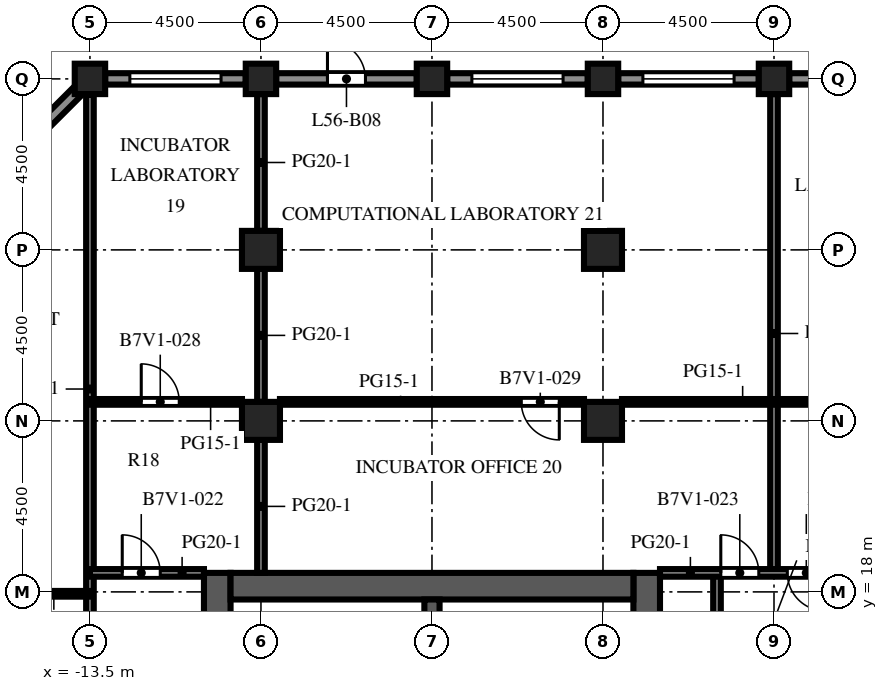
"""IFC4 building model, lengths in metres.
Left out: names, types, materials, properties, quantities, classifications, styles, units other than length and angle.
Written with IfcOpenShell. Run it as: python <this file> out.ifc"""

import sys

from ifc_helpers import new_model, si_unit, direction, frame, frame_2d, origin, origin_2d, place, context, subcontext, project, spatial, rectangle, extrude, element, fill, save


model = new_model("IFC4")
c1 = context("Model", 3, precision=1e-05, world=origin(), true_north=direction((0.0, 1.0)))
c2 = subcontext(c1, "Body", "Model", "MODEL_VIEW")
j1 = project(units=[si_unit("LENGTHUNIT", "METRE"), si_unit("PLANEANGLEUNIT", "RADIAN")], contexts=[c1])
p1 = place(None, origin())
s1 = spatial("IfcSite", under=j1, at=p1, CompositionType="ELEMENT")
p2 = place(p1, origin())
s2 = spatial("IfcBuilding", under=s1, at=p2, CompositionType="ELEMENT")
p3 = place(p2, frame((0.0, 0.0, 248.0)))
s3 = spatial("IfcBuildingStorey", under=s2, at=p3, CompositionType="ELEMENT", Elevation=248.0)
for number, where, z_axis, x_axis in (
    (1, (-13.5, 31.5, 0.0), (0.0, 0.0, 1.0), (1.0, 0.0, 0.0)),
    (2, (-9.0, 31.5, 0.0), (0.0, 0.0, 1.0), (1.0, 0.0, 0.0)),
    (3, (-4.5, 31.5, 0.0), (0.0, 0.0, 1.0), (1.0, 0.0, 0.0)),
    (4, (0.0, 31.5, 0.0), (0.0, 0.0, 1.0), (1.0, 0.0, 0.0)),
    (5, (4.5, 31.5, 0.0), (0.0, 0.0, 1.0), (1.0, 0.0, 0.0)),
):
    element("IfcColumn", number, at=place(p3, frame(where, z_axis=z_axis, x_axis=x_axis)), inside=s3, PredefinedType="COLUMN", context=c2, shape_type="SweptSolid", body=[
        extrude(rectangle(XDim=0.8, YDim=0.8, at=origin_2d()), origin(), (0.0, 0.0, 1.0), 4.1),
    ])
for number, where, z_axis, x_axis in (
    (6, (-9.0, 22.5, 0.0), (0.0, 0.0, 1.0), (1.0, 0.0, 0.0)),
    (7, (-9.0, 27.0, 0.0), (0.0, 0.0, 1.0), (1.0, 0.0, 0.0)),
    (8, (0.0, 22.5, 0.0), (0.0, 0.0, 1.0), (1.0, 0.0, 0.0)),
    (9, (0.0, 27.0, 0.0), (0.0, 0.0, 1.0), (1.0, 0.0, 0.0)),
):
    element("IfcColumn", number, at=place(p3, frame(where, z_axis=z_axis, x_axis=x_axis)), inside=s3, PredefinedType="COLUMN", context=c2, shape_type="SweptSolid", body=[
        extrude(rectangle(XDim=1.0, YDim=1.0, at=origin_2d()), origin(), (0.0, 0.0, 1.0), 4.1),
    ])
p4 = place(p3, frame((-10.15, -9.0, 0.0), z_axis=(0.0, 0.0, 1.0), x_axis=(0.0, 1.0, 0.0)))
e10 = element("IfcWall", 10, at=p4, inside=s3, PredefinedType="SHEAR", context=c2, shape_type="SweptSolid", body=[
    extrude(rectangle(XDim=27.5, YDim=0.7, at=frame_2d((13.75, 0.0))), origin(), (0.0, 0.0, 1.0), 4.1),
])
p5 = place(p4, frame((12.55, 0.0, 0.0)))
e11 = element("IfcOpeningElement", 11, at=p5, cuts=e10, PredefinedType="OPENING", context=c2, shape_type="SweptSolid", body=[
    extrude(rectangle(XDim=2.4, YDim=2.4, at=frame_2d((1.2, 1.2))), frame((0.0, 0.36, 0.0), z_axis=(0.0, -1.0, 0.0), x_axis=(1.0, 0.0, 0.0)), (0.0, 0.0, 1.0), 0.72),
])
p6 = place(p4, frame((6.825, 0.0, 0.0)))
e12 = element("IfcOpeningElement", 12, at=p6, cuts=e10, PredefinedType="OPENING", context=c2, shape_type="SweptSolid", body=[
    extrude(rectangle(XDim=1.2, YDim=2.1, at=frame_2d((0.6, 1.05))), frame((0.0, 0.36, 0.0), z_axis=(0.0, -1.0, 0.0), x_axis=(1.0, 0.0, 0.0)), (0.0, 0.0, 1.0), 0.72),
])
p7 = place(p4, frame((19.475, 0.0, 0.0)))
e13 = element("IfcOpeningElement", 13, at=p7, cuts=e10, PredefinedType="OPENING", context=c2, shape_type="SweptSolid", body=[
    extrude(rectangle(XDim=1.2, YDim=2.1, at=frame_2d((0.6, 1.05))), frame((0.0, 0.36, 0.0), z_axis=(0.0, -1.0, 0.0), x_axis=(1.0, 0.0, 0.0)), (0.0, 0.0, 1.0), 0.72),
])
p8 = place(p3, frame((1.15, -9.0, 0.0), z_axis=(0.0, 0.0, 1.0), x_axis=(0.0, 1.0, 0.0)))
e14 = element("IfcWall", 14, at=p8, inside=s3, PredefinedType="SHEAR", context=c2, shape_type="SweptSolid", body=[
    extrude(rectangle(XDim=27.5, YDim=0.7, at=frame_2d((13.75, 0.0))), origin(), (0.0, 0.0, 1.0), 4.1),
])
p9 = place(p8, frame((12.55, 0.0, 0.0)))
e15 = element("IfcOpeningElement", 15, at=p9, cuts=e14, PredefinedType="OPENING", context=c2, shape_type="SweptSolid", body=[
    extrude(rectangle(XDim=2.4, YDim=2.4, at=frame_2d((1.2, 1.2))), frame((0.0, 0.36, 0.0), z_axis=(0.0, -1.0, 0.0), x_axis=(1.0, 0.0, 0.0)), (0.0, 0.0, 1.0), 0.72),
])
p10 = place(p8, frame((3.9, 0.0, 0.0)))
e16 = element("IfcOpeningElement", 16, at=p10, cuts=e14, PredefinedType="OPENING", context=c2, shape_type="SweptSolid", body=[
    extrude(rectangle(XDim=1.2, YDim=2.1, at=frame_2d((0.6, 1.05))), frame((0.0, 0.36, 0.0), z_axis=(0.0, -1.0, 0.0), x_axis=(1.0, 0.0, 0.0)), (0.0, 0.0, 1.0), 0.72),
])
p11 = place(p8, frame((22.4, 0.0, 0.0)))
e17 = element("IfcOpeningElement", 17, at=p11, cuts=e14, PredefinedType="OPENING", context=c2, shape_type="SweptSolid", body=[
    extrude(rectangle(XDim=1.2, YDim=2.1, at=frame_2d((0.6, 1.05))), frame((0.0, 0.36, 0.0), z_axis=(0.0, -1.0, 0.0), x_axis=(1.0, 0.0, 0.0)), (0.0, 0.0, 1.0), 0.72),
])
p12 = place(p3, frame((-9.8, 18.15, 0.0), z_axis=(0.0, 0.0, 1.0), x_axis=(1.0, 0.0, 0.0)))
e18 = element("IfcWall", 18, at=p12, inside=s3, PredefinedType="SHEAR", context=c2, shape_type="SweptSolid", body=[
    extrude(rectangle(XDim=10.6, YDim=0.7, at=frame_2d((5.3, 0.0))), origin(), (0.0, 0.0, 1.0), 4.1),
])
p13 = place(p3, frame((-4.5, 10.2, 0.0), z_axis=(0.0, 0.0, 1.0), x_axis=(0.0, 1.0, 0.0)))
e19 = element("IfcWall", 19, at=p13, inside=s3, PredefinedType="SHEAR", context=c2, shape_type="SweptSolid", body=[
    extrude(rectangle(XDim=7.6, YDim=0.4, at=frame_2d((3.8, 0.0))), origin(), (0.0, 0.0, 1.0), 4.1),
])
p14 = place(p3, frame((4.9, 31.5, 0.0), z_axis=(0.0, 0.0, 1.0), x_axis=(1.0, 0.0, 0.0)))
e20 = element("IfcWall", 20, at=p14, inside=s3, PredefinedType="SOLIDWALL", context=c2, shape_type="SweptSolid", body=[
    extrude(rectangle(XDim=3.7, YDim=0.3, at=frame_2d((1.85, 0.0))), origin(), (0.0, 0.0, 1.0), 2.85),
])
p15 = place(p14, frame((0.65, 0.0, 0.8)))
e21 = element("IfcOpeningElement", 21, at=p15, cuts=e20, PredefinedType="OPENING", context=c2, shape_type="SweptSolid", body=[
    extrude(rectangle(XDim=2.4, YDim=1.7, at=frame_2d((1.2, 0.85))), frame((0.0, 0.16, 0.0), z_axis=(0.0, -1.0, 0.0), x_axis=(1.0, 0.0, 0.0)), (0.0, 0.0, 1.0), 0.32),
])
p16 = place(p3, frame((0.4, 31.5, 0.0), z_axis=(0.0, 0.0, 1.0), x_axis=(1.0, 0.0, 0.0)))
e22 = element("IfcWall", 22, at=p16, inside=s3, PredefinedType="SOLIDWALL", context=c2, shape_type="SweptSolid", body=[
    extrude(rectangle(XDim=3.7, YDim=0.3, at=frame_2d((1.85, 0.0))), origin(), (0.0, 0.0, 1.0), 2.85),
])
p17 = place(p16, frame((0.65, 0.0, 0.8)))
e23 = element("IfcOpeningElement", 23, at=p17, cuts=e22, PredefinedType="OPENING", context=c2, shape_type="SweptSolid", body=[
    extrude(rectangle(XDim=2.4, YDim=1.7, at=frame_2d((1.2, 0.85))), frame((0.0, 0.16, 0.0), z_axis=(0.0, -1.0, 0.0), x_axis=(1.0, 0.0, 0.0)), (0.0, 0.0, 1.0), 0.32),
])
p18 = place(p3, frame((-4.1, 31.5, 0.0), z_axis=(0.0, 0.0, 1.0), x_axis=(1.0, 0.0, 0.0)))
e24 = element("IfcWall", 24, at=p18, inside=s3, PredefinedType="SOLIDWALL", context=c2, shape_type="SweptSolid", body=[
    extrude(rectangle(XDim=3.7, YDim=0.3, at=frame_2d((1.85, 0.0))), origin(), (0.0, 0.0, 1.0), 2.85),
])
p19 = place(p18, frame((0.65, 0.0, 0.8)))
e25 = element("IfcOpeningElement", 25, at=p19, cuts=e24, PredefinedType="OPENING", context=c2, shape_type="SweptSolid", body=[
    extrude(rectangle(XDim=2.4, YDim=1.7, at=frame_2d((1.2, 0.85))), frame((0.0, 0.16, 0.0), z_axis=(0.0, -1.0, 0.0), x_axis=(1.0, 0.0, 0.0)), (0.0, 0.0, 1.0), 0.32),
])
p20 = place(p3, frame((-8.6, 31.5, 0.0), z_axis=(0.0, 0.0, 1.0), x_axis=(1.0, 0.0, 0.0)))
e26 = element("IfcWall", 26, at=p20, inside=s3, PredefinedType="SOLIDWALL", context=c2, shape_type="SweptSolid", body=[
    extrude(rectangle(XDim=3.7, YDim=0.3, at=frame_2d((1.85, 0.0))), origin(), (0.0, 0.0, 1.0), 2.85),
])
p21 = place(p20, frame((1.35, 0.0, 0.0)))
e27 = element("IfcOpeningElement", 27, at=p21, cuts=e26, PredefinedType="OPENING", context=c2, shape_type="SweptSolid", body=[
    extrude(rectangle(XDim=1.0, YDim=2.2, at=frame_2d((0.5, 1.1))), frame((0.0, 0.16, 0.0), z_axis=(0.0, -1.0, 0.0), x_axis=(1.0, 0.0, 0.0)), (0.0, 0.0, 1.0), 0.32),
])
p22 = place(p3, frame((-13.1, 31.5, 0.0), z_axis=(0.0, 0.0, 1.0), x_axis=(1.0, 0.0, 0.0)))
e28 = element("IfcWall", 28, at=p22, inside=s3, PredefinedType="SOLIDWALL", context=c2, shape_type="SweptSolid", body=[
    extrude(rectangle(XDim=3.7, YDim=0.3, at=frame_2d((1.85, 0.0))), origin(), (0.0, 0.0, 1.0), 2.85),
])
p23 = place(p22, frame((0.65, 0.0, 0.8)))
e29 = element("IfcOpeningElement", 29, at=p23, cuts=e28, PredefinedType="OPENING", context=c2, shape_type="SweptSolid", body=[
    extrude(rectangle(XDim=2.4, YDim=1.7, at=frame_2d((1.2, 0.85))), frame((0.0, 0.16, 0.0), z_axis=(0.0, -1.0, 0.0), x_axis=(1.0, 0.0, 0.0)), (0.0, 0.0, 1.0), 0.32),
])
p24 = place(p3, frame((-17.706, 27.294, 0.0), z_axis=(0.0, 0.0, 1.0), x_axis=(0.707106781187, 0.707106781187, 0.0)))
e30 = element("IfcWall", 30, at=p24, inside=s3, PredefinedType="SOLIDWALL", context=c2, shape_type="SweptSolid", body=[
    extrude(rectangle(XDim=5.532, YDim=0.3, at=frame_2d((2.766, 0.0))), origin(), (0.0, 0.0, 1.0), 2.85),
])
p25 = place(p24, frame((2.166, 0.0, 0.0)))
e31 = element("IfcOpeningElement", 31, at=p25, cuts=e30, PredefinedType="OPENING", context=c2, shape_type="SweptSolid", body=[
    extrude(rectangle(XDim=1.2, YDim=2.2, at=frame_2d((0.6, 1.1))), frame((0.0, 0.16, 0.0), z_axis=(0.0, -1.0, 0.0), x_axis=(1.0, 0.0, 0.0)), (0.0, 0.0, 1.0), 0.32),
])
p26 = place(p3, frame((-0.6, 14.912, 0.0), z_axis=(0.0, 0.0, 1.0), x_axis=(0.0, 1.0, 0.0)))
e32 = element("IfcWall", 32, at=p26, inside=s3, PredefinedType="PARTITIONING", context=c2, shape_type="SweptSolid", body=[
    extrude(rectangle(XDim=2.888, YDim=0.1, at=frame_2d((1.444, 0.0))), origin(), (0.0, 0.0, 1.0), 3.65),
])
p27 = place(p26, frame((0.944, 0.0, 0.0)))
e33 = element("IfcOpeningElement", 33, at=p27, cuts=e32, PredefinedType="OPENING", context=c2, shape_type="SweptSolid", body=[
    extrude(rectangle(XDim=1.0, YDim=2.1, at=frame_2d((0.5, 1.05))), frame((0.0, 0.06, 0.0), z_axis=(0.0, -1.0, 0.0), x_axis=(1.0, 0.0, 0.0)), (0.0, 0.0, 1.0), 0.12),
])
p28 = place(p3, frame((-13.5, 6.25, 0.0), z_axis=(0.0, 0.0, 1.0), x_axis=(0.0, 1.0, 0.0)))
e34 = element("IfcWall", 34, at=p28, inside=s3, PredefinedType="PARTITIONING", context=c2, shape_type="SweptSolid", body=[
    extrude(rectangle(XDim=24.827, YDim=0.2, at=frame_2d((12.414, 0.0))), origin(), (0.0, 0.0, 1.0), 3.65),
])
p29 = place(p28, frame((8.35, 0.0, 0.0)))
e35 = element("IfcOpeningElement", 35, at=p29, cuts=e34, PredefinedType="OPENING", context=c2, shape_type="SweptSolid", body=[
    extrude(rectangle(XDim=1.0, YDim=2.1, at=frame_2d((0.5, 1.05))), frame((0.0, 0.11, 0.0), z_axis=(0.0, -1.0, 0.0), x_axis=(1.0, 0.0, 0.0)), (0.0, 0.0, 1.0), 0.22),
])
for number, where, z_axis, x_axis in (
    (36, (-9.0, 18.5, 0.0), (0.0, 0.0, 1.0), (0.0, 1.0, 0.0)),
    (37, (-9.0, 23.0, 0.0), (0.0, 0.0, 1.0), (0.0, 1.0, 0.0)),
):
    element("IfcWall", number, at=place(p3, frame(where, z_axis=z_axis, x_axis=x_axis)), inside=s3, PredefinedType="PARTITIONING", context=c2, shape_type="SweptSolid", body=[
        extrude(rectangle(XDim=3.5, YDim=0.2, at=frame_2d((1.75, 0.0))), origin(), (0.0, 0.0, 1.0), 3.65),
    ])
p30 = place(p3, frame((-9.0, 27.5, 0.0), z_axis=(0.0, 0.0, 1.0), x_axis=(0.0, 1.0, 0.0)))
e38 = element("IfcWall", 38, at=p30, inside=s3, PredefinedType="PARTITIONING", context=c2, shape_type="SweptSolid", body=[
    extrude(rectangle(XDim=3.6, YDim=0.2, at=frame_2d((1.8, 0.0))), origin(), (0.0, 0.0, 1.0), 3.65),
])
p31 = place(p3, frame((3.0, 6.7, 0.0), z_axis=(0.0, 0.0, 1.0), x_axis=(0.0, 1.0, 0.0)))
e39 = element("IfcWall", 39, at=p31, inside=s3, PredefinedType="PARTITIONING", context=c2, shape_type="SweptSolid", body=[
    extrude(rectangle(XDim=11.8, YDim=0.2, at=frame_2d((5.9, 0.0))), origin(), (0.0, 0.0, 1.0), 3.65),
])
p32 = place(p31, frame((6.1, 0.0, 0.0)))
e40 = element("IfcOpeningElement", 40, at=p32, cuts=e39, PredefinedType="OPENING", context=c2, shape_type="SweptSolid", body=[
    extrude(rectangle(XDim=1.0, YDim=2.1, at=frame_2d((0.5, 1.05))), frame((0.0, 0.11, 0.0), z_axis=(0.0, -1.0, 0.0), x_axis=(1.0, 0.0, 0.0)), (0.0, 0.0, 1.0), 0.22),
])
p33 = place(p3, frame((4.5, 18.5, 0.0), z_axis=(0.0, 0.0, 1.0), x_axis=(0.0, 1.0, 0.0)))
e41 = element("IfcWall", 41, at=p33, inside=s3, PredefinedType="PARTITIONING", context=c2, shape_type="SweptSolid", body=[
    extrude(rectangle(XDim=12.6, YDim=0.2, at=frame_2d((6.3, 0.0))), origin(), (0.0, 0.0, 1.0), 3.65),
])
p34 = place(p3, frame((-17.6, 17.95, 0.0), z_axis=(0.0, 0.0, 1.0), x_axis=(1.0, 0.0, 0.0)))
e42 = element("IfcWall", 42, at=p34, inside=s3, PredefinedType="PARTITIONING", context=c2, shape_type="SweptSolid", body=[
    extrude(rectangle(XDim=4.1, YDim=0.15, at=frame_2d((2.05, 0.0))), origin(), (0.0, 0.0, 1.0), 3.65),
])
p35 = place(p34, frame((1.2, 0.0, 0.0)))
e43 = element("IfcOpeningElement", 43, at=p35, cuts=e42, PredefinedType="OPENING", context=c2, shape_type="SweptSolid", body=[
    extrude(rectangle(XDim=1.0, YDim=2.1, at=frame_2d((0.5, 1.05))), frame((0.0, 0.085, 0.0), z_axis=(0.0, -1.0, 0.0), x_axis=(1.0, 0.0, 0.0)), (0.0, 0.0, 1.0), 0.17),
])
p36 = place(p3, frame((-13.5, 18.5, 0.0), z_axis=(0.0, 0.0, 1.0), x_axis=(1.0, 0.0, 0.0)))
e44 = element("IfcWall", 44, at=p36, inside=s3, PredefinedType="PARTITIONING", context=c2, shape_type="SweptSolid", body=[
    extrude(rectangle(XDim=3.0, YDim=0.2, at=frame_2d((1.5, 0.0))), origin(), (0.0, 0.0, 1.0), 3.65),
])
p37 = place(p36, frame((0.85, 0.0, 0.0)))
e45 = element("IfcOpeningElement", 45, at=p37, cuts=e44, PredefinedType="OPENING", context=c2, shape_type="SweptSolid", body=[
    extrude(rectangle(XDim=1.0, YDim=2.1, at=frame_2d((0.5, 1.05))), frame((0.0, 0.11, 0.0), z_axis=(0.0, -1.0, 0.0), x_axis=(1.0, 0.0, 0.0)), (0.0, 0.0, 1.0), 0.22),
])
p38 = place(p3, frame((1.5, 18.5, 0.0), z_axis=(0.0, 0.0, 1.0), x_axis=(1.0, 0.0, 0.0)))
e46 = element("IfcWall", 46, at=p38, inside=s3, PredefinedType="PARTITIONING", context=c2, shape_type="SweptSolid", body=[
    extrude(rectangle(XDim=4.5, YDim=0.2, at=frame_2d((2.25, 0.0))), origin(), (0.0, 0.0, 1.0), 3.65),
])
p39 = place(p38, frame((1.6, 0.0, 0.0)))
e47 = element("IfcOpeningElement", 47, at=p39, cuts=e46, PredefinedType="OPENING", context=c2, shape_type="SweptSolid", body=[
    extrude(rectangle(XDim=1.0, YDim=2.1, at=frame_2d((0.5, 1.05))), frame((0.0, 0.11, 0.0), z_axis=(0.0, -1.0, 0.0), x_axis=(1.0, 0.0, 0.0)), (0.0, 0.0, 1.0), 0.22),
])
p40 = place(p38, frame((3.35, 0.0, 0.0)))
e48 = element("IfcOpeningElement", 48, at=p40, cuts=e46, PredefinedType="OPENING", context=c2, shape_type="SweptSolid", body=[
    extrude(rectangle(XDim=1.0, YDim=2.1, at=frame_2d((0.5, 1.05))), frame((0.0, 0.11, 0.0), z_axis=(0.0, -1.0, 0.0), x_axis=(1.0, 0.0, 0.0)), (0.0, 0.0, 1.0), 0.22),
])
p41 = place(p3, frame((-13.5, 23.0, 0.0), z_axis=(0.0, 0.0, 1.0), x_axis=(1.0, 0.0, 0.0)))
e49 = element("IfcWall", 49, at=p41, inside=s3, PredefinedType="PARTITIONING", context=c2, shape_type="SweptSolid", body=[
    extrude(rectangle(XDim=4.0, YDim=0.15, at=frame_2d((2.0, 0.0))), origin(), (0.0, 0.0, 1.0), 3.65),
])
p42 = place(p41, frame((1.35, 0.0, 0.0)))
e50 = element("IfcOpeningElement", 50, at=p42, cuts=e49, PredefinedType="OPENING", context=c2, shape_type="SweptSolid", body=[
    extrude(rectangle(XDim=1.0, YDim=2.1, at=frame_2d((0.5, 1.05))), frame((0.0, 0.085, 0.0), z_axis=(0.0, -1.0, 0.0), x_axis=(1.0, 0.0, 0.0)), (0.0, 0.0, 1.0), 0.17),
])
p43 = place(p3, frame((-8.5, 23.0, 0.0), z_axis=(0.0, 0.0, 1.0), x_axis=(1.0, 0.0, 0.0)))
e51 = element("IfcWall", 51, at=p43, inside=s3, PredefinedType="PARTITIONING", context=c2, shape_type="SweptSolid", body=[
    extrude(rectangle(XDim=8.0, YDim=0.15, at=frame_2d((4.0, 0.0))), origin(), (0.0, 0.0, 1.0), 3.65),
])
p44 = place(p43, frame((6.35, 0.0, 0.0)))
e52 = element("IfcOpeningElement", 52, at=p44, cuts=e51, PredefinedType="OPENING", context=c2, shape_type="SweptSolid", body=[
    extrude(rectangle(XDim=1.0, YDim=2.1, at=frame_2d((0.5, 1.05))), frame((0.0, 0.085, 0.0), z_axis=(0.0, -1.0, 0.0), x_axis=(1.0, 0.0, 0.0)), (0.0, 0.0, 1.0), 0.17),
])
p45 = place(p3, frame((0.5, 23.0, 0.0), z_axis=(0.0, 0.0, 1.0), x_axis=(1.0, 0.0, 0.0)))
e53 = element("IfcWall", 53, at=p45, inside=s3, PredefinedType="PARTITIONING", context=c2, shape_type="SweptSolid", body=[
    extrude(rectangle(XDim=8.0, YDim=0.15, at=frame_2d((4.0, 0.0))), origin(), (0.0, 0.0, 1.0), 3.65),
])
p46 = place(p45, frame((6.35, 0.0, 0.0)))
e54 = element("IfcOpeningElement", 54, at=p46, cuts=e53, PredefinedType="OPENING", context=c2, shape_type="SweptSolid", body=[
    extrude(rectangle(XDim=1.0, YDim=2.1, at=frame_2d((0.5, 1.05))), frame((0.0, 0.085, 0.0), z_axis=(0.0, -1.0, 0.0), x_axis=(1.0, 0.0, 0.0)), (0.0, 0.0, 1.0), 0.17),
])
p47 = place(p17, origin())
e55 = element("IfcWindow", 55, at=p47, inside=s3, PartitioningType="SINGLE_PANEL", PredefinedType="WINDOW", context=c2, shape_type="SweptSolid", body=[
    extrude(rectangle(XDim=2.4, YDim=1.7, at=frame_2d((1.2, 0.85))), frame((0.0, 0.03, 0.0), z_axis=(0.0, -1.0, 0.0), x_axis=(1.0, 0.0, 0.0)), (0.0, 0.0, 1.0), 0.06),
])
fill(e23, e55)
p48 = place(p19, origin())
e56 = element("IfcWindow", 56, at=p48, inside=s3, PartitioningType="SINGLE_PANEL", PredefinedType="WINDOW", context=c2, shape_type="SweptSolid", body=[
    extrude(rectangle(XDim=2.4, YDim=1.7, at=frame_2d((1.2, 0.85))), frame((0.0, 0.03, 0.0), z_axis=(0.0, -1.0, 0.0), x_axis=(1.0, 0.0, 0.0)), (0.0, 0.0, 1.0), 0.06),
])
fill(e25, e56)
p49 = place(p21, origin())
e57 = element("IfcDoor", 57, at=p49, inside=s3, OperationType="SINGLE_SWING_LEFT", PredefinedType="DOOR", context=c2, shape_type="SweptSolid", body=[
    extrude(rectangle(XDim=1.0, YDim=2.2, at=frame_2d((0.5, 1.1))), frame((0.0, 0.025, 0.0), z_axis=(0.0, -1.0, 0.0), x_axis=(1.0, 0.0, 0.0)), (0.0, 0.0, 1.0), 0.05),
])
fill(e27, e57)
p50 = place(p23, origin())
e58 = element("IfcWindow", 58, at=p50, inside=s3, PartitioningType="SINGLE_PANEL", PredefinedType="WINDOW", context=c2, shape_type="SweptSolid", body=[
    extrude(rectangle(XDim=2.4, YDim=1.7, at=frame_2d((1.2, 0.85))), frame((0.0, 0.03, 0.0), z_axis=(0.0, -1.0, 0.0), x_axis=(1.0, 0.0, 0.0)), (0.0, 0.0, 1.0), 0.06),
])
fill(e29, e58)
p51 = place(p37, origin())
e59 = element("IfcDoor", 59, at=p51, inside=s3, OperationType="SINGLE_SWING_LEFT", PredefinedType="DOOR", context=c2, shape_type="SweptSolid", body=[
    extrude(rectangle(XDim=1.0, YDim=2.1, at=frame_2d((0.5, 1.05))), frame((0.0, 0.025, 0.0), z_axis=(0.0, -1.0, 0.0), x_axis=(1.0, 0.0, 0.0)), (0.0, 0.0, 1.0), 0.05),
])
fill(e45, e59)
p52 = place(p39, origin())
e60 = element("IfcDoor", 60, at=p52, inside=s3, OperationType="SINGLE_SWING_LEFT", PredefinedType="DOOR", context=c2, shape_type="SweptSolid", body=[
    extrude(rectangle(XDim=1.0, YDim=2.1, at=frame_2d((0.5, 1.05))), frame((0.0, 0.025, 0.0), z_axis=(0.0, -1.0, 0.0), x_axis=(1.0, 0.0, 0.0)), (0.0, 0.0, 1.0), 0.05),
])
fill(e47, e60)
p53 = place(p40, origin())
e61 = element("IfcDoor", 61, at=p53, inside=s3, OperationType="SINGLE_SWING_RIGHT", PredefinedType="DOOR", context=c2, shape_type="SweptSolid", body=[
    extrude(rectangle(XDim=1.0, YDim=2.1, at=frame_2d((0.5, 1.05))), frame((0.0, 0.025, 0.0), z_axis=(0.0, -1.0, 0.0), x_axis=(1.0, 0.0, 0.0)), (0.0, 0.0, 1.0), 0.05),
])
fill(e48, e61)
p54 = place(p42, origin())
e62 = element("IfcDoor", 62, at=p54, inside=s3, OperationType="SINGLE_SWING_LEFT", PredefinedType="DOOR", context=c2, shape_type="SweptSolid", body=[
    extrude(rectangle(XDim=1.0, YDim=2.1, at=frame_2d((0.5, 1.05))), frame((0.0, 0.025, 0.0), z_axis=(0.0, -1.0, 0.0), x_axis=(1.0, 0.0, 0.0)), (0.0, 0.0, 1.0), 0.05),
])
fill(e50, e62)
p55 = place(p44, origin())
e63 = element("IfcDoor", 63, at=p55, inside=s3, OperationType="SINGLE_SWING_RIGHT", PredefinedType="DOOR", context=c2, shape_type="SweptSolid", body=[
    extrude(rectangle(XDim=1.0, YDim=2.1, at=frame_2d((0.5, 1.05))), frame((0.0, 0.025, 0.0), z_axis=(0.0, -1.0, 0.0), x_axis=(1.0, 0.0, 0.0)), (0.0, 0.0, 1.0), 0.05),
])
fill(e52, e63)
save(model, sys.argv[1])
